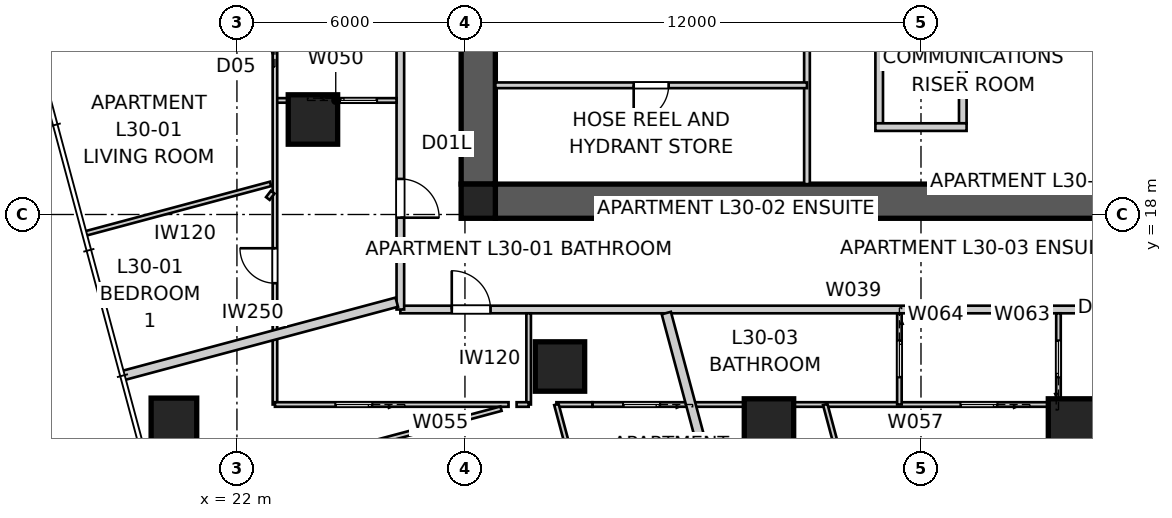
"""IFC4 building model, lengths in metres.
Left out: names, types, materials, properties, quantities, classifications, styles, units other than length and angle.
Written with IfcOpenShell. Run it as: python <this file> out.ifc"""

import sys

from ifc_helpers import new_model, si_unit, direction, frame, frame_2d, origin, origin_2d, place, context, subcontext, project, spatial, polyline, rectangle, outline, extrude, element, fill, save


model = new_model("IFC4")
c1 = context("Model", 3, precision=1e-05, world=origin(), true_north=direction((0.0, 1.0)))
c2 = subcontext(c1, "Body", "Model", "MODEL_VIEW")
j1 = project(units=[si_unit("LENGTHUNIT", "METRE"), si_unit("PLANEANGLEUNIT", "RADIAN")], contexts=[c1])
p1 = place(None, origin())
s1 = spatial("IfcSite", under=j1, at=p1, CompositionType="ELEMENT")
p2 = place(p1, origin())
s2 = spatial("IfcBuilding", under=s1, at=p2, CompositionType="ELEMENT")
p3 = place(p2, frame((0.0, 0.0, 111.6)))
s3 = spatial("IfcBuildingStorey", under=s2, at=p3, CompositionType="ELEMENT", Elevation=111.6)
p4 = place(p3, frame((51.2, 18.35, 0.0), z_axis=(0.0, 0.0, 1.0), x_axis=(-1.0, 0.0, 0.0)))
e1 = element("IfcWall", 1, at=p4, inside=s3, PredefinedType="SHEAR", context=c2, shape_type="SweptSolid", body=[
    extrude(outline(polyline([(0.0, -0.45), (22.4, -0.45), (22.4, -0.025), (22.85, -0.025), (22.85, 0.025), (22.4, 0.025), (22.4, 0.45), (0.0, 0.45), (0.0, 0.025), (-0.45, 0.025), (-0.45, -0.025), (0.0, -0.025), (0.0, -0.45)])), origin(), (0.0, 0.0, 1.0), 3.4),
])
p5 = place(p3, frame((28.35, 41.2, 0.0), z_axis=(0.0, 0.0, 1.0), x_axis=(0.0, -1.0, 0.0)))
e2 = element("IfcWall", 2, at=p5, inside=s3, PredefinedType="SHEAR", context=c2, shape_type="SweptSolid", body=[
    extrude(outline(polyline([(0.0, -0.45), (22.4, -0.45), (22.4, -0.025), (22.85, -0.025), (22.85, 0.025), (22.4, 0.025), (22.4, 0.45), (0.0, 0.45), (0.0, 0.025), (-0.45, 0.025), (-0.45, -0.025), (0.0, -0.025), (0.0, -0.45)])), origin(), (0.0, 0.0, 1.0), 3.4),
])
p6 = place(p5, frame((11.14, 0.0, 0.0)))
e3 = element("IfcOpeningElement", 3, at=p6, cuts=e2, PredefinedType="OPENING", context=c2, shape_type="SweptSolid", body=[
    extrude(rectangle(XDim=1.02, YDim=2.4, at=frame_2d((0.51, 1.2))), frame((0.0, 0.46, 0.0), z_axis=(0.0, -1.0, 0.0), x_axis=(1.0, 0.0, 0.0)), (0.0, 0.0, 1.0), 0.92),
])
for number, where, z_axis, x_axis in (
    (4, (38.9, 22.4, 0.0), (0.0, 0.0, 1.0), (0.0, -1.0, 0.0)),
    (5, (41.1, 22.4, 0.0), (0.0, 0.0, 1.0), (0.0, -1.0, 0.0)),
):
    element("IfcWall", number, at=place(p3, frame(where, z_axis=z_axis, x_axis=x_axis)), inside=s3, PredefinedType="SOLIDWALL", context=c2, shape_type="SweptSolid", body=[
        extrude(rectangle(XDim=2.0, YDim=0.2, at=frame_2d((1.0, 0.0))), origin(), (0.0, 0.0, 1.0), 3.4),
    ])
p7 = place(p3, frame((38.8, 20.3, 0.0), z_axis=(0.0, 0.0, 1.0), x_axis=(1.0, 0.0, 0.0)))
e6 = element("IfcWall", 6, at=p7, inside=s3, PredefinedType="SOLIDWALL", context=c2, shape_type="SweptSolid", body=[
    extrude(rectangle(XDim=2.4, YDim=0.2, at=frame_2d((1.2, 0.0))), origin(), (0.0, 0.0, 1.0), 3.4),
])
p8 = place(p3, frame((28.35, 18.35, 0.0), z_axis=(0.0, 0.0, 1.0), x_axis=(1.0, 0.0, 0.0)))
e7 = element("IfcColumn", 7, at=p8, inside=s3, PredefinedType="COLUMN", context=c2, shape_type="SweptSolid", body=[
    extrude(rectangle(XDim=0.9, YDim=0.9, at=origin_2d()), origin(), (0.0, 0.0, 1.0), 3.4),
])
p9 = place(p3, frame((20.342, 12.568, -0.15), z_axis=(0.0, 0.0, 1.0), x_axis=(1.0, 0.0, 0.0)))
e8 = element("IfcColumn", 8, at=p9, inside=s3, PredefinedType="COLUMN", context=c2, shape_type="SweptSolid", body=[
    extrude(rectangle(XDim=1.2, YDim=1.2, at=origin_2d()), origin(), (0.0, 0.0, 1.0), 3.55),
])
for number, where, z_axis, x_axis in (
    (9, (24.0, 20.5, 0.0), (0.0, 0.0, 1.0), (1.0, 0.0, 0.0)),
    (10, (30.5, 14.0, 0.0), (0.0, 0.0, 1.0), (1.0, 0.0, 0.0)),
    (11, (36.0, 12.5, 0.0), (0.0, 0.0, 1.0), (1.0, 0.0, 0.0)),
    (12, (44.0, 12.5, 0.0), (0.0, 0.0, 1.0), (1.0, 0.0, 0.0)),
):
    element("IfcColumn", number, at=place(p3, frame(where, z_axis=z_axis, x_axis=x_axis)), inside=s3, PredefinedType="COLUMN", context=c2, shape_type="SweptSolid", body=[
        extrude(rectangle(XDim=1.3, YDim=1.3, at=origin_2d()), origin(), (0.0, 0.0, 1.0), 3.4),
    ])
p10 = place(p3, frame((26.3, 15.5, 0.0), z_axis=(0.0, 0.0, 1.0), x_axis=(1.0, 0.0, 0.0)))
e13 = element("IfcWall", 13, at=p10, inside=s3, PredefinedType="PARTITIONING", context=c2, shape_type="SweptSolid", body=[
    extrude(rectangle(XDim=28.2, YDim=0.2, at=frame_2d((14.1, 0.0))), origin(), (0.0, 0.0, 1.0), 3.25),
])
p11 = place(p10, frame((21.474, 0.0, 0.0)))
e14 = element("IfcOpeningElement", 14, at=p11, cuts=e13, PredefinedType="OPENING", context=c2, shape_type="SweptSolid", body=[
    extrude(rectangle(XDim=1.02, YDim=2.34, at=frame_2d((0.51, 1.17))), frame((0.0, 0.11, 0.0), z_axis=(0.0, -1.0, 0.0), x_axis=(1.0, 0.0, 0.0)), (0.0, 0.0, 1.0), 0.22),
])
p12 = place(p10, frame((1.353, 0.0, 0.0)))
e15 = element("IfcOpeningElement", 15, at=p12, cuts=e13, PredefinedType="OPENING", context=c2, shape_type="SweptSolid", body=[
    extrude(rectangle(XDim=1.02, YDim=2.1, at=frame_2d((0.51, 1.05))), frame((0.0, 0.11, 0.0), z_axis=(0.0, -1.0, 0.0), x_axis=(1.0, 0.0, 0.0)), (0.0, 0.0, 1.0), 0.22),
])
p13 = place(p3, frame((26.3, 42.52, 0.0), z_axis=(0.0, 0.0, 1.0), x_axis=(0.0, -1.0, 0.0)))
e16 = element("IfcWall", 16, at=p13, inside=s3, PredefinedType="PARTITIONING", context=c2, shape_type="SweptSolid", body=[
    extrude(rectangle(XDim=27.02, YDim=0.2, at=frame_2d((13.51, 0.0))), origin(), (0.0, 0.0, 1.0), 3.25),
])
p14 = place(p13, frame((23.584, 0.0, 0.0)))
e17 = element("IfcOpeningElement", 17, at=p14, cuts=e16, PredefinedType="OPENING", context=c2, shape_type="SweptSolid", body=[
    extrude(rectangle(XDim=1.02, YDim=2.1, at=frame_2d((0.51, 1.05))), frame((0.0, 0.11, 0.0), z_axis=(0.0, -1.0, 0.0), x_axis=(1.0, 0.0, 0.0)), (0.0, 0.0, 1.0), 0.22),
])
p15 = place(p13, frame((13.468, 0.0, 0.0)))
e18 = element("IfcOpeningElement", 18, at=p15, cuts=e16, PredefinedType="OPENING", context=c2, shape_type="SweptSolid", body=[
    extrude(rectangle(XDim=1.02, YDim=2.34, at=frame_2d((0.51, 1.17))), frame((0.0, 0.11, 0.0), z_axis=(0.0, -1.0, 0.0), x_axis=(1.0, 0.0, 0.0)), (0.0, 0.0, 1.0), 0.22),
])
p16 = place(p3, frame((36.44, 3.682, 0.0), z_axis=(0.0, 0.0, 1.0), x_axis=(-0.258824223352, 0.965924438766, 0.0)))
e19 = element("IfcWall", 19, at=p16, inside=s3, PredefinedType="PARTITIONING", context=c2, shape_type="SweptSolid", body=[
    extrude(rectangle(XDim=12.138, YDim=0.25, at=frame_2d((6.069, 0.0))), origin(), (0.0, 0.0, 1.0), 3.25),
])
p17 = place(p3, frame((18.988, 13.758, 0.0), z_axis=(0.0, 0.0, 1.0), x_axis=(0.965929532284, 0.258805213744, 0.0)))
e20 = element("IfcWall", 20, at=p17, inside=s3, PredefinedType="PARTITIONING", context=c2, shape_type="SweptSolid", body=[
    extrude(rectangle(XDim=7.473, YDim=0.25, at=frame_2d((3.737, 0.0))), origin(), (0.0, 0.0, 1.0), 3.25),
])
p18 = place(p3, frame((37.0, 18.8, 0.0), z_axis=(0.0, 0.0, 1.0), x_axis=(0.0, 1.0, 0.0)))
e21 = element("IfcWall", 21, at=p18, inside=s3, PredefinedType="SOLIDWALL", context=c2, shape_type="SweptSolid", body=[
    extrude(rectangle(XDim=5.9, YDim=0.15, at=frame_2d((2.95, 0.0))), origin(), (0.0, 0.0, 1.0), 3.25),
])
p19 = place(p3, frame((37.0, 21.4, 0.0), z_axis=(0.0, 0.0, 1.0), x_axis=(-1.0, 0.0, 0.0)))
e22 = element("IfcWall", 22, at=p19, inside=s3, PredefinedType="SOLIDWALL", context=c2, shape_type="SweptSolid", body=[
    extrude(rectangle(XDim=8.2, YDim=0.15, at=frame_2d((4.1, 0.0))), origin(), (0.0, 0.0, 1.0), 3.25),
])
p20 = place(p19, frame((3.64, 0.0, 0.0)))
e23 = element("IfcOpeningElement", 23, at=p20, cuts=e22, PredefinedType="OPENING", context=c2, shape_type="SweptSolid", body=[
    extrude(rectangle(XDim=0.92, YDim=2.1, at=frame_2d((0.46, 1.05))), frame((0.0, 0.085, 0.0), z_axis=(0.0, -1.0, 0.0), x_axis=(1.0, 0.0, 0.0)), (0.0, 0.0, 1.0), 0.17),
])
p21 = place(p3, frame((23.0, 21.002, 0.0), z_axis=(0.0, 0.0, 1.0), x_axis=(1.0, 0.0, 0.0)))
e24 = element("IfcWall", 24, at=p21, inside=s3, PredefinedType="PARTITIONING", context=c2, shape_type="SweptSolid", body=[
    extrude(rectangle(XDim=3.2, YDim=0.12, at=frame_2d((1.6, 0.0))), origin(), (0.0, 0.0, 1.0), 3.25),
])
p22 = place(p21, frame((1.72, 0.0, 0.0)))
e25 = element("IfcOpeningElement", 25, at=p22, cuts=e24, PredefinedType="OPENING", context=c2, shape_type="SweptSolid", body=[
    extrude(rectangle(XDim=0.96, YDim=2.1, at=frame_2d((0.48, 1.05))), frame((0.0, 0.07, 0.0), z_axis=(0.0, -1.0, 0.0), x_axis=(1.0, 0.0, 0.0)), (0.0, 0.0, 1.0), 0.14),
])
p23 = place(p3, frame((23.0, 13.0, 0.0), z_axis=(0.0, 0.0, 1.0), x_axis=(0.0, 1.0, 0.0)))
e26 = element("IfcWall", 26, at=p23, inside=s3, PredefinedType="PARTITIONING", context=c2, shape_type="SweptSolid", body=[
    extrude(rectangle(XDim=27.64, YDim=0.12, at=frame_2d((13.82, 0.0))), origin(), (0.0, 0.0, 1.0), 2.55),
])
p24 = place(p23, frame((3.192, 0.0, 0.0)))
e27 = element("IfcOpeningElement", 27, at=p24, cuts=e26, PredefinedType="OPENING", context=c2, shape_type="SweptSolid", body=[
    extrude(rectangle(XDim=0.92, YDim=2.34, at=frame_2d((0.46, 1.17))), frame((0.0, 0.07, 0.0), z_axis=(0.0, -1.0, 0.0), x_axis=(1.0, 0.0, 0.0)), (0.0, 0.0, 1.0), 0.14),
])
p25 = place(p23, frame((13.779, 0.0, 0.0)))
e28 = element("IfcOpeningElement", 28, at=p25, cuts=e26, PredefinedType="OPENING", context=c2, shape_type="SweptSolid", body=[
    extrude(rectangle(XDim=0.92, YDim=2.34, at=frame_2d((0.46, 1.17))), frame((0.0, 0.07, 0.0), z_axis=(0.0, -1.0, 0.0), x_axis=(1.0, 0.0, 0.0)), (0.0, 0.0, 1.0), 0.14),
])
p26 = place(p23, frame((16.374, 0.0, 0.0)))
e29 = element("IfcOpeningElement", 29, at=p26, cuts=e26, PredefinedType="OPENING", context=c2, shape_type="SweptSolid", body=[
    extrude(rectangle(XDim=0.92, YDim=2.34, at=frame_2d((0.46, 1.17))), frame((0.0, 0.07, 0.0), z_axis=(0.0, -1.0, 0.0), x_axis=(1.0, 0.0, 0.0)), (0.0, 0.0, 1.0), 0.14),
])
p27 = place(p23, frame((9.743, 0.0, 0.0)))
e30 = element("IfcOpeningElement", 30, at=p27, cuts=e26, PredefinedType="OPENING", context=c2, shape_type="SweptSolid", body=[
    extrude(rectangle(XDim=0.96, YDim=2.1, at=frame_2d((0.48, 1.05))), frame((0.0, 0.07, 0.0), z_axis=(0.0, -1.0, 0.0), x_axis=(1.0, 0.0, 0.0)), (0.0, 0.0, 1.0), 0.14),
])
p28 = place(p23, frame((24.879, 0.0, 0.0)))
e31 = element("IfcOpeningElement", 31, at=p28, cuts=e26, PredefinedType="OPENING", context=c2, shape_type="SweptSolid", body=[
    extrude(rectangle(XDim=0.96, YDim=2.1, at=frame_2d((0.48, 1.05))), frame((0.0, 0.07, 0.0), z_axis=(0.0, -1.0, 0.0), x_axis=(1.0, 0.0, 0.0)), (0.0, 0.0, 1.0), 0.14),
])
p29 = place(p3, frame((22.813, 18.42, 0.0), z_axis=(0.0, 0.0, 1.0), x_axis=(0.609039064162, 0.793140226142, 0.0)))
e32 = element("IfcWall", 32, at=p29, inside=s3, PredefinedType="PARTITIONING", context=c2, shape_type="SweptSolid", body=[
    extrude(rectangle(XDim=0.211, YDim=0.12, at=frame_2d((0.105, 0.0))), origin(), (0.0, 0.0, 1.0), 3.25),
])
p30 = place(p3, frame((22.884, 18.805, 0.0), z_axis=(0.0, 0.0, 1.0), x_axis=(-0.965921615375, -0.258834759935, 0.0)))
e33 = element("IfcWall", 33, at=p30, inside=s3, PredefinedType="PARTITIONING", context=c2, shape_type="SweptSolid", body=[
    extrude(rectangle(XDim=5.029, YDim=0.12, at=frame_2d((2.515, 0.0))), origin(), (0.0, 0.0, 1.0), 2.722),
])
p31 = place(p3, frame((29.676, 15.4, 0.0), z_axis=(0.0, 0.0, 1.0), x_axis=(0.0, -1.0, 0.0)))
e34 = element("IfcWall", 34, at=p31, inside=s3, PredefinedType="PARTITIONING", context=c2, shape_type="SweptSolid", body=[
    extrude(rectangle(XDim=2.4, YDim=0.12, at=frame_2d((1.2, 0.0))), origin(), (0.0, 0.0, 1.0), 3.25),
])
p32 = place(p3, frame((29.147, 13.0, 0.0), z_axis=(0.0, 0.0, 1.0), x_axis=(-1.0, 0.0, 0.0)))
e35 = element("IfcWall", 35, at=p32, inside=s3, PredefinedType="PARTITIONING", context=c2, shape_type="SweptSolid", body=[
    extrude(rectangle(XDim=6.147, YDim=0.12, at=frame_2d((3.074, 0.0))), origin(), (0.0, 0.0, 1.0), 3.25),
])
p33 = place(p32, frame((3.591, 0.0, 0.0)))
e36 = element("IfcOpeningElement", 36, at=p33, cuts=e35, PredefinedType="OPENING", context=c2, shape_type="SweptSolid", body=[
    extrude(rectangle(XDim=0.96, YDim=2.1, at=frame_2d((0.48, 1.05))), frame((0.0, 0.07, 0.0), z_axis=(0.0, -1.0, 0.0), x_axis=(1.0, 0.0, 0.0)), (0.0, 0.0, 1.0), 0.14),
])
p34 = place(p3, frame((55.046, 13.0, 0.0), z_axis=(0.0, 0.0, 1.0), x_axis=(-1.0, 0.0, 0.0)))
e37 = element("IfcWall", 37, at=p34, inside=s3, PredefinedType="PARTITIONING", context=c2, shape_type="SweptSolid", body=[
    extrude(rectangle(XDim=23.693, YDim=0.12, at=frame_2d((11.846, 0.0))), origin(), (0.0, 0.0, 1.0), 2.55),
])
p35 = place(p34, frame((8.262, 0.0, 0.0)))
e38 = element("IfcOpeningElement", 38, at=p35, cuts=e37, PredefinedType="OPENING", context=c2, shape_type="SweptSolid", body=[
    extrude(rectangle(XDim=0.92, YDim=2.34, at=frame_2d((0.46, 1.17))), frame((0.0, 0.07, 0.0), z_axis=(0.0, -1.0, 0.0), x_axis=(1.0, 0.0, 0.0)), (0.0, 0.0, 1.0), 0.14),
])
p36 = place(p34, frame((3.825, 0.0, 0.0)))
e39 = element("IfcOpeningElement", 39, at=p36, cuts=e37, PredefinedType="OPENING", context=c2, shape_type="SweptSolid", body=[
    extrude(rectangle(XDim=0.92, YDim=2.34, at=frame_2d((0.46, 1.17))), frame((0.0, 0.07, 0.0), z_axis=(0.0, -1.0, 0.0), x_axis=(1.0, 0.0, 0.0)), (0.0, 0.0, 1.0), 0.14),
])
p37 = place(p34, frame((1.274, 0.0, 0.0)))
e40 = element("IfcOpeningElement", 40, at=p37, cuts=e37, PredefinedType="OPENING", context=c2, shape_type="SweptSolid", body=[
    extrude(rectangle(XDim=0.92, YDim=2.34, at=frame_2d((0.46, 1.17))), frame((0.0, 0.07, 0.0), z_axis=(0.0, -1.0, 0.0), x_axis=(1.0, 0.0, 0.0)), (0.0, 0.0, 1.0), 0.14),
])
p38 = place(p34, frame((13.041, 0.0, 0.0)))
e41 = element("IfcOpeningElement", 41, at=p38, cuts=e37, PredefinedType="OPENING", context=c2, shape_type="SweptSolid", body=[
    extrude(rectangle(XDim=0.96, YDim=2.1, at=frame_2d((0.48, 1.05))), frame((0.0, 0.07, 0.0), z_axis=(0.0, -1.0, 0.0), x_axis=(1.0, 0.0, 0.0)), (0.0, 0.0, 1.0), 0.14),
])
p39 = place(p34, frame((21.917, 0.0, 0.0)))
e42 = element("IfcOpeningElement", 42, at=p39, cuts=e37, PredefinedType="OPENING", context=c2, shape_type="SweptSolid", body=[
    extrude(rectangle(XDim=0.96, YDim=2.1, at=frame_2d((0.48, 1.05))), frame((0.0, 0.07, 0.0), z_axis=(0.0, -1.0, 0.0), x_axis=(1.0, 0.0, 0.0)), (0.0, 0.0, 1.0), 0.14),
])
p40 = place(p3, frame((30.406, 13.0, 0.0), z_axis=(0.0, 0.0, 1.0), x_axis=(0.258797552287, -0.965931585015, 0.0)))
e43 = element("IfcWall", 43, at=p40, inside=s3, PredefinedType="PARTITIONING", context=c2, shape_type="SweptSolid", body=[
    extrude(rectangle(XDim=10.522, YDim=0.12, at=frame_2d((5.261, 0.0))), origin(), (0.0, 0.0, 1.0), 2.722),
])
p41 = place(p40, frame((1.846, 0.0, 0.0)))
e44 = element("IfcOpeningElement", 44, at=p41, cuts=e43, PredefinedType="OPENING", context=c2, shape_type="SweptSolid", body=[
    extrude(rectangle(XDim=0.92, YDim=2.34, at=frame_2d((0.46, 1.17))), frame((0.0, 0.07, 0.0), z_axis=(0.0, -1.0, 0.0), x_axis=(1.0, 0.0, 0.0)), (0.0, 0.0, 1.0), 0.14),
])
p42 = place(p3, frame((19.911, 10.468, 0.0), z_axis=(0.0, 0.0, 1.0), x_axis=(0.965927203676, 0.25881390457, 0.0)))
e45 = element("IfcWall", 45, at=p42, inside=s3, PredefinedType="PARTITIONING", context=c2, shape_type="SweptSolid", body=[
    extrude(rectangle(XDim=9.357, YDim=0.12, at=frame_2d((4.678, 0.0))), origin(), (0.0, 0.0, 1.0), 2.638),
])
p43 = place(p42, frame((4.391, 0.0, 0.0)))
e46 = element("IfcOpeningElement", 46, at=p43, cuts=e45, PredefinedType="OPENING", context=c2, shape_type="SweptSolid", body=[
    extrude(rectangle(XDim=0.96, YDim=2.1, at=frame_2d((0.48, 1.05))), frame((0.0, 0.07, 0.0), z_axis=(0.0, -1.0, 0.0), x_axis=(1.0, 0.0, 0.0)), (0.0, 0.0, 1.0), 0.14),
])
p44 = place(p3, frame((43.618, 13.0, 0.0), z_axis=(0.0, 0.0, 1.0), x_axis=(0.0, 1.0, 0.0)))
e47 = element("IfcWall", 47, at=p44, inside=s3, PredefinedType="PARTITIONING", context=c2, shape_type="SweptSolid", body=[
    extrude(rectangle(XDim=2.4, YDim=0.12, at=frame_2d((1.2, 0.0))), origin(), (0.0, 0.0, 1.0), 3.25),
])
p45 = place(p44, frame((0.72, 0.0, 0.0)))
e48 = element("IfcOpeningElement", 48, at=p45, cuts=e47, PredefinedType="OPENING", context=c2, shape_type="SweptSolid", body=[
    extrude(rectangle(XDim=0.96, YDim=2.1, at=frame_2d((0.48, 1.05))), frame((0.0, 0.07, 0.0), z_axis=(0.0, -1.0, 0.0), x_axis=(1.0, 0.0, 0.0)), (0.0, 0.0, 1.0), 0.14),
])
p46 = place(p3, frame((39.432, 15.4, 0.0), z_axis=(0.0, 0.0, 1.0), x_axis=(0.0, -1.0, 0.0)))
e49 = element("IfcWall", 49, at=p46, inside=s3, PredefinedType="PARTITIONING", context=c2, shape_type="SweptSolid", body=[
    extrude(rectangle(XDim=2.4, YDim=0.12, at=frame_2d((1.2, 0.0))), origin(), (0.0, 0.0, 1.0), 3.25),
])
p47 = place(p46, frame((0.72, 0.0, 0.0)))
e50 = element("IfcOpeningElement", 50, at=p47, cuts=e49, PredefinedType="OPENING", context=c2, shape_type="SweptSolid", body=[
    extrude(rectangle(XDim=0.96, YDim=2.1, at=frame_2d((0.48, 1.05))), frame((0.0, 0.07, 0.0), z_axis=(0.0, -1.0, 0.0), x_axis=(1.0, 0.0, 0.0)), (0.0, 0.0, 1.0), 0.14),
])
p48 = place(p3, frame((39.73, 4.605, 0.0), z_axis=(0.0, 0.0, 1.0), x_axis=(-0.258819860698, 0.965925607751, 0.0)))
e51 = element("IfcWall", 51, at=p48, inside=s3, PredefinedType="PARTITIONING", context=c2, shape_type="SweptSolid", body=[
    extrude(rectangle(XDim=8.691, YDim=0.12, at=frame_2d((4.346, 0.0))), origin(), (0.0, 0.0, 1.0), 3.25),
])
p49 = place(p48, frame((3.866, 0.0, 0.0)))
e52 = element("IfcOpeningElement", 52, at=p49, cuts=e51, PredefinedType="OPENING", context=c2, shape_type="SweptSolid", body=[
    extrude(rectangle(XDim=0.92, YDim=2.34, at=frame_2d((0.46, 1.17))), frame((0.0, 0.07, 0.0), z_axis=(0.0, -1.0, 0.0), x_axis=(1.0, 0.0, 0.0)), (0.0, 0.0, 1.0), 0.14),
])
p50 = place(p3, frame((44.555, 13.0, 0.0), z_axis=(0.0, 0.0, 1.0), x_axis=(0.258829770556, -0.965922952349, 0.0)))
e53 = element("IfcWall", 53, at=p50, inside=s3, PredefinedType="PARTITIONING", context=c2, shape_type="SweptSolid", body=[
    extrude(rectangle(XDim=6.86, YDim=0.12, at=frame_2d((3.43, 0.0))), origin(), (0.0, 0.0, 1.0), 3.25),
])
p51 = place(p3, frame((29.676, 13.0, 0.0), z_axis=(0.0, 0.0, 1.0), x_axis=(-1.0, 0.0, 0.0)))
e54 = element("IfcWall", 54, at=p51, inside=s3, PredefinedType="PARTITIONING", context=c2, shape_type="SweptSolid", body=[
    extrude(rectangle(XDim=0.317, YDim=0.12, at=frame_2d((0.158, 0.0))), origin(), (0.0, 0.0, 1.0), 3.25),
])
p52 = place(p3, frame((31.354, 13.0, 0.0), z_axis=(0.0, 0.0, 1.0), x_axis=(-1.0, 0.0, 0.0)))
e55 = element("IfcWall", 55, at=p52, inside=s3, PredefinedType="PARTITIONING", context=c2, shape_type="SweptSolid", body=[
    extrude(rectangle(XDim=0.947, YDim=0.12, at=frame_2d((0.474, 0.0))), origin(), (0.0, 0.0, 1.0), 3.25),
])
p53 = place(p14, origin())
e56 = element("IfcDoor", 56, at=p53, inside=s3, OperationType="SINGLE_SWING_RIGHT", PredefinedType="DOOR", context=c2, shape_type="SweptSolid", body=[
    extrude(rectangle(XDim=1.02, YDim=2.1, at=frame_2d((0.51, 1.05))), frame((0.0, 0.025, 0.0), z_axis=(0.0, -1.0, 0.0), x_axis=(1.0, 0.0, 0.0)), (0.0, 0.0, 1.0), 0.05),
])
fill(e17, e56)
p54 = place(p12, origin())
e57 = element("IfcDoor", 57, at=p54, inside=s3, OperationType="SINGLE_SWING_LEFT", PredefinedType="DOOR", context=c2, shape_type="SweptSolid", body=[
    extrude(rectangle(XDim=1.02, YDim=2.1, at=frame_2d((0.51, 1.05))), frame((0.0, 0.025, 0.0), z_axis=(0.0, -1.0, 0.0), x_axis=(1.0, 0.0, 0.0)), (0.0, 0.0, 1.0), 0.05),
])
fill(e15, e57)
p55 = place(p20, origin())
e58 = element("IfcDoor", 58, at=p55, inside=s3, OperationType="SINGLE_SWING_RIGHT", PredefinedType="DOOR", context=c2, shape_type="SweptSolid", body=[
    extrude(rectangle(XDim=0.92, YDim=2.1, at=frame_2d((0.46, 1.05))), frame((0.0, 0.025, 0.0), z_axis=(0.0, -1.0, 0.0), x_axis=(1.0, 0.0, 0.0)), (0.0, 0.0, 1.0), 0.05),
])
fill(e23, e58)
p56 = place(p45, origin())
e59 = element("IfcDoor", 59, at=p56, inside=s3, OperationType="SLIDING_TO_LEFT", PredefinedType="DOOR", context=c2, shape_type="SweptSolid", body=[
    extrude(rectangle(XDim=0.96, YDim=2.1, at=frame_2d((0.48, 1.05))), frame((0.0, 0.025, 0.0), z_axis=(0.0, -1.0, 0.0), x_axis=(1.0, 0.0, 0.0)), (0.0, 0.0, 1.0), 0.05),
])
fill(e48, e59)
p57 = place(p24, origin())
e60 = element("IfcDoor", 60, at=p57, inside=s3, OperationType="SINGLE_SWING_RIGHT", PredefinedType="DOOR", context=c2, shape_type="SweptSolid", body=[
    extrude(rectangle(XDim=0.92, YDim=2.34, at=frame_2d((0.46, 1.17))), frame((0.0, 0.025, 0.0), z_axis=(0.0, -1.0, 0.0), x_axis=(1.0, 0.0, 0.0)), (0.0, 0.0, 1.0), 0.05),
])
fill(e27, e60)
p58 = place(p22, origin())
e61 = element("IfcDoor", 61, at=p58, inside=s3, OperationType="SLIDING_TO_LEFT", PredefinedType="DOOR", context=c2, shape_type="SweptSolid", body=[
    extrude(rectangle(XDim=0.96, YDim=2.1, at=frame_2d((0.48, 1.05))), frame((0.0, 0.025, 0.0), z_axis=(0.0, -1.0, 0.0), x_axis=(1.0, 0.0, 0.0)), (0.0, 0.0, 1.0), 0.05),
])
fill(e25, e61)
p59 = place(p33, origin())
e62 = element("IfcDoor", 62, at=p59, inside=s3, OperationType="SLIDING_TO_LEFT", PredefinedType="DOOR", context=c2, shape_type="SweptSolid", body=[
    extrude(rectangle(XDim=0.96, YDim=2.1, at=frame_2d((0.48, 1.05))), frame((0.0, 0.025, 0.0), z_axis=(0.0, -1.0, 0.0), x_axis=(1.0, 0.0, 0.0)), (0.0, 0.0, 1.0), 0.05),
])
fill(e36, e62)
p60 = place(p38, origin())
e63 = element("IfcDoor", 63, at=p60, inside=s3, OperationType="SLIDING_TO_LEFT", PredefinedType="DOOR", context=c2, shape_type="SweptSolid", body=[
    extrude(rectangle(XDim=0.96, YDim=2.1, at=frame_2d((0.48, 1.05))), frame((0.0, 0.025, 0.0), z_axis=(0.0, -1.0, 0.0), x_axis=(1.0, 0.0, 0.0)), (0.0, 0.0, 1.0), 0.05),
])
fill(e41, e63)
p61 = place(p47, origin())
e64 = element("IfcDoor", 64, at=p61, inside=s3, OperationType="SLIDING_TO_LEFT", PredefinedType="DOOR", context=c2, shape_type="SweptSolid", body=[
    extrude(rectangle(XDim=0.96, YDim=2.1, at=frame_2d((0.48, 1.05))), frame((0.0, 0.025, 0.0), z_axis=(0.0, -1.0, 0.0), x_axis=(1.0, 0.0, 0.0)), (0.0, 0.0, 1.0), 0.05),
])
fill(e50, e64)
p62 = place(p39, origin())
e65 = element("IfcDoor", 65, at=p62, inside=s3, OperationType="SLIDING_TO_LEFT", PredefinedType="DOOR", context=c2, shape_type="SweptSolid", body=[
    extrude(rectangle(XDim=0.96, YDim=2.1, at=frame_2d((0.48, 1.05))), frame((0.0, 0.025, 0.0), z_axis=(0.0, -1.0, 0.0), x_axis=(1.0, 0.0, 0.0)), (0.0, 0.0, 1.0), 0.05),
])
fill(e42, e65)
save(model, sys.argv[1])
